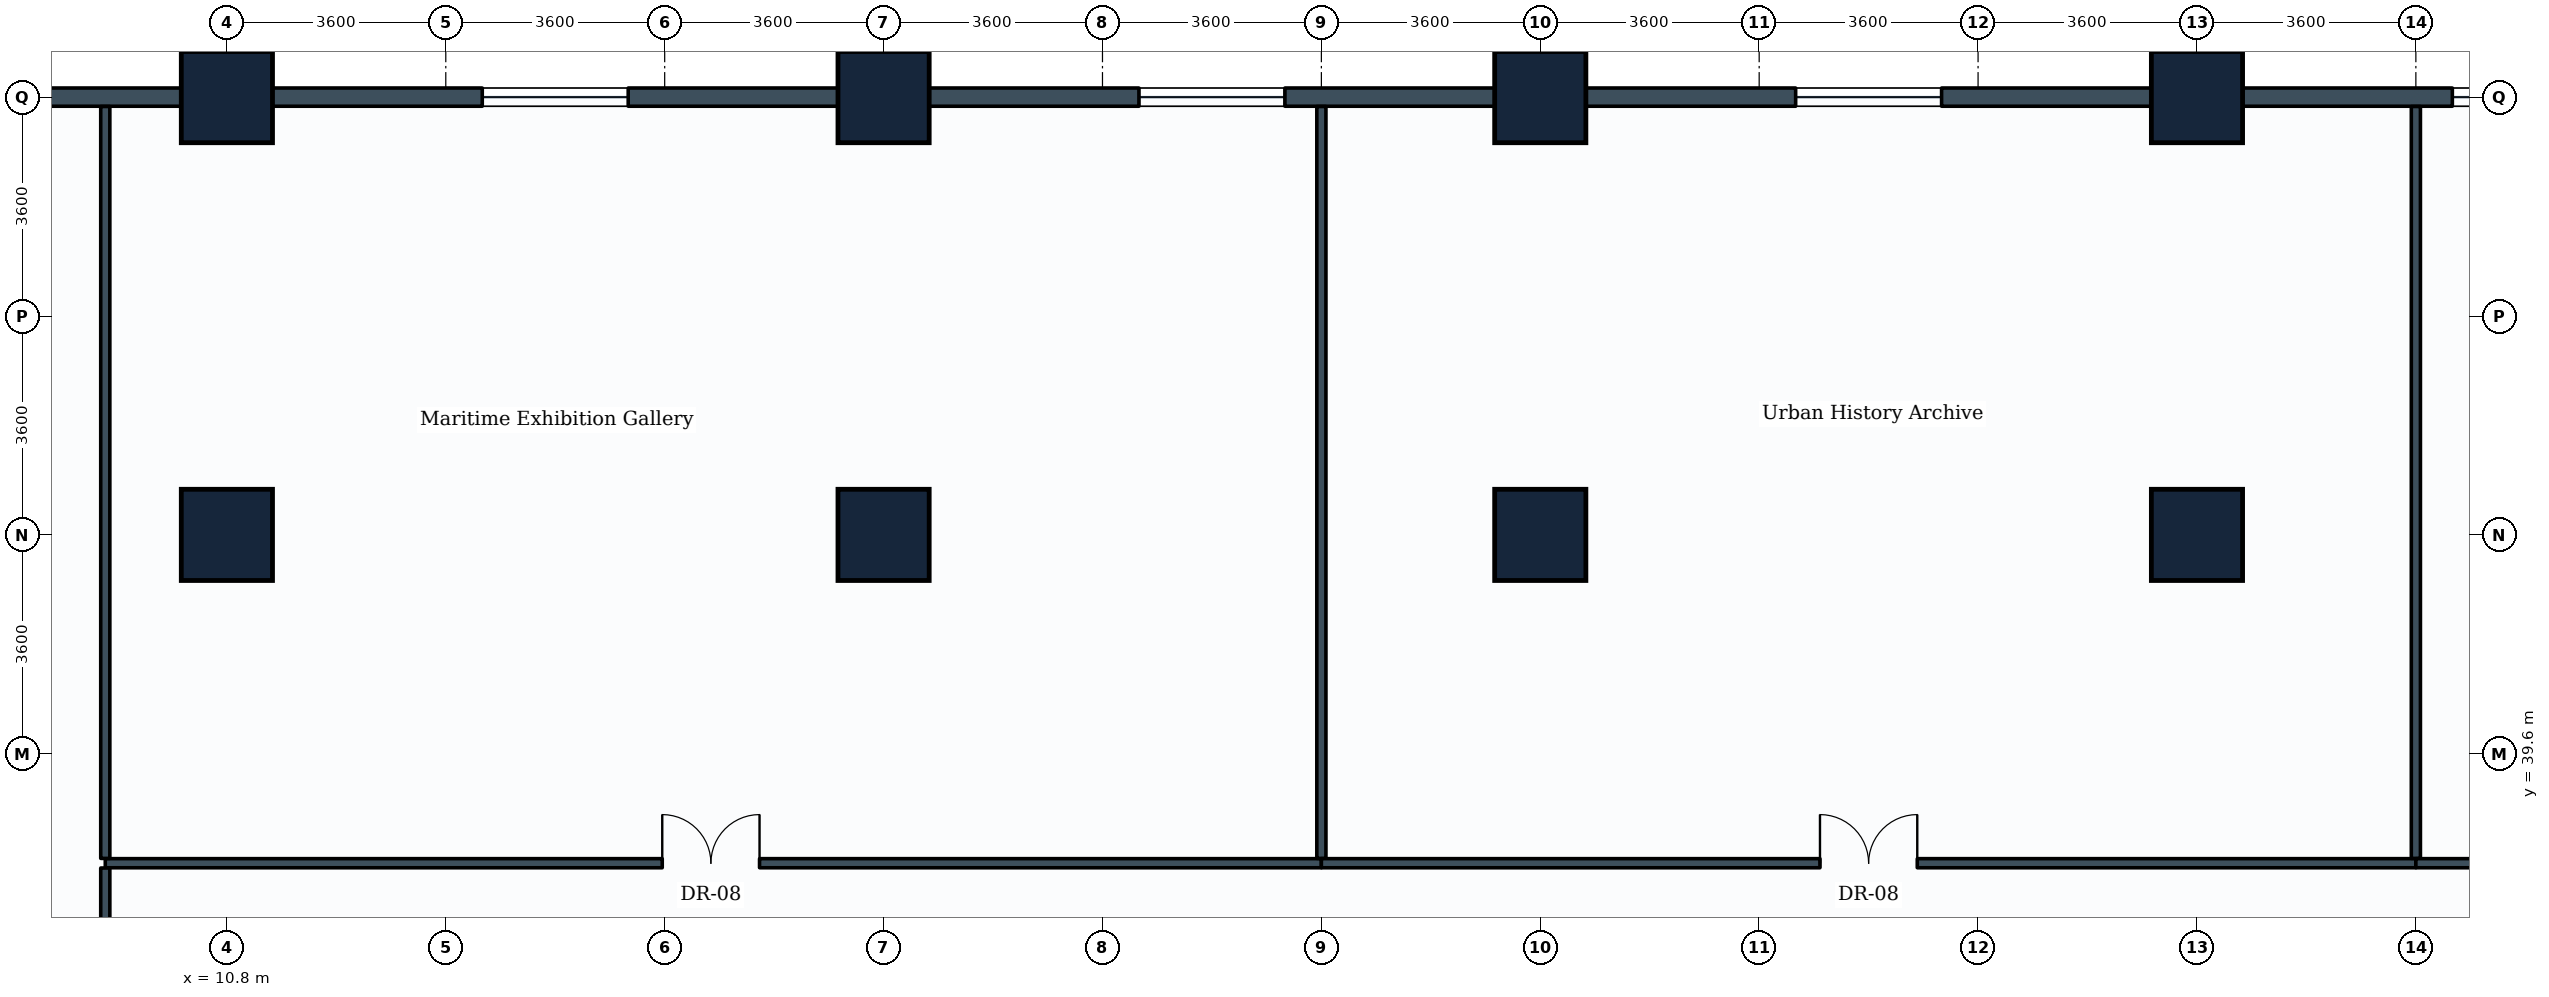
"""IFC4 building model, lengths in metres.
Left out: names, types, materials, properties, quantities, classifications, styles, units other than length and angle.
Written with IfcOpenShell. Run it as: python <this file> out.ifc"""

import sys

from ifc_helpers import new_model, si_unit, direction, frame, frame_2d, origin, origin_2d, place, context, subcontext, project, spatial, rectangle, extrude, element, fill, save


model = new_model("IFC4")
c1 = context("Model", 3, precision=1e-05, world=origin(), true_north=direction((0.0, 1.0)))
c2 = subcontext(c1, "Body", "Model", "MODEL_VIEW")
j1 = project(units=[si_unit("LENGTHUNIT", "METRE"), si_unit("PLANEANGLEUNIT", "RADIAN")], contexts=[c1])
p1 = place(None, origin())
s1 = spatial("IfcSite", under=j1, at=p1, CompositionType="ELEMENT")
p2 = place(p1, origin())
s2 = spatial("IfcBuilding", under=s1, at=p2, CompositionType="ELEMENT")
p3 = place(p2, frame((0.0, 0.0, 10.2)))
s3 = spatial("IfcBuildingStorey", under=s2, at=p3, CompositionType="ELEMENT", Elevation=10.2)
for number, where, z_axis, x_axis in (
    (1, (10.8, 43.2, 0.0), (0.0, 0.0, 1.0), (1.0, 0.0, 0.0)),
    (2, (10.8, 50.4, 0.0), (0.0, 0.0, 1.0), (1.0, 0.0, 0.0)),
    (3, (21.6, 43.2, 0.0), (0.0, 0.0, 1.0), (1.0, 0.0, 0.0)),
    (4, (21.6, 50.4, 0.0), (0.0, 0.0, 1.0), (1.0, 0.0, 0.0)),
    (5, (32.4, 43.2, 0.0), (0.0, 0.0, 1.0), (1.0, 0.0, 0.0)),
    (6, (32.4, 50.4, 0.0), (0.0, 0.0, 1.0), (1.0, 0.0, 0.0)),
    (7, (43.2, 43.2, 0.0), (0.0, 0.0, 1.0), (1.0, 0.0, 0.0)),
    (8, (43.2, 50.4, 0.0), (0.0, 0.0, 1.0), (1.0, 0.0, 0.0)),
):
    element("IfcColumn", number, at=place(p3, frame(where, z_axis=z_axis, x_axis=x_axis)), inside=s3, PredefinedType="COLUMN", context=c2, shape_type="SweptSolid", body=[
        extrude(rectangle(XDim=1.5, YDim=1.5, at=origin_2d()), origin(), (0.0, 0.0, 1.0), 4.6),
    ])
p4 = place(p3, frame((0.0, 50.4, 0.0), z_axis=(0.0, 0.0, 1.0), x_axis=(1.0, 0.0, 0.0)))
e9 = element("IfcWall", 9, at=p4, inside=s3, PredefinedType="STANDARD", context=c2, shape_type="SweptSolid", body=[
    extrude(rectangle(XDim=10.8, YDim=0.3, at=frame_2d((5.4, 0.0))), origin(), (0.0, 0.0, 1.0), 3.63),
])
p5 = place(p4, frame((4.2, 0.0, 0.85)))
e10 = element("IfcOpeningElement", 10, at=p5, cuts=e9, PredefinedType="OPENING", context=c2, shape_type="SweptSolid", body=[
    extrude(rectangle(XDim=2.4, YDim=1.6, at=frame_2d((1.2, 0.8))), frame((0.0, 0.16, 0.0), z_axis=(0.0, -1.0, 0.0), x_axis=(1.0, 0.0, 0.0)), (0.0, 0.0, 1.0), 0.32),
])
p6 = place(p3, frame((10.8, 50.4, 0.0), z_axis=(0.0, 0.0, 1.0), x_axis=(1.0, 0.0, 0.0)))
e11 = element("IfcWall", 11, at=p6, inside=s3, PredefinedType="STANDARD", context=c2, shape_type="SweptSolid", body=[
    extrude(rectangle(XDim=10.8, YDim=0.3, at=frame_2d((5.4, 0.0))), origin(), (0.0, 0.0, 1.0), 3.63),
])
p7 = place(p6, frame((4.2, 0.0, 0.85)))
e12 = element("IfcOpeningElement", 12, at=p7, cuts=e11, PredefinedType="OPENING", context=c2, shape_type="SweptSolid", body=[
    extrude(rectangle(XDim=2.4, YDim=1.6, at=frame_2d((1.2, 0.8))), frame((0.0, 0.16, 0.0), z_axis=(0.0, -1.0, 0.0), x_axis=(1.0, 0.0, 0.0)), (0.0, 0.0, 1.0), 0.32),
])
p8 = place(p3, frame((21.6, 50.4, 0.0), z_axis=(0.0, 0.0, 1.0), x_axis=(1.0, 0.0, 0.0)))
e13 = element("IfcWall", 13, at=p8, inside=s3, PredefinedType="STANDARD", context=c2, shape_type="SweptSolid", body=[
    extrude(rectangle(XDim=10.8, YDim=0.3, at=frame_2d((5.4, 0.0))), origin(), (0.0, 0.0, 1.0), 3.63),
])
p9 = place(p8, frame((4.2, 0.0, 0.85)))
e14 = element("IfcOpeningElement", 14, at=p9, cuts=e13, PredefinedType="OPENING", context=c2, shape_type="SweptSolid", body=[
    extrude(rectangle(XDim=2.4, YDim=1.6, at=frame_2d((1.2, 0.8))), frame((0.0, 0.16, 0.0), z_axis=(0.0, -1.0, 0.0), x_axis=(1.0, 0.0, 0.0)), (0.0, 0.0, 1.0), 0.32),
])
p10 = place(p3, frame((32.4, 50.4, 0.0), z_axis=(0.0, 0.0, 1.0), x_axis=(1.0, 0.0, 0.0)))
e15 = element("IfcWall", 15, at=p10, inside=s3, PredefinedType="STANDARD", context=c2, shape_type="SweptSolid", body=[
    extrude(rectangle(XDim=10.8, YDim=0.3, at=frame_2d((5.4, 0.0))), origin(), (0.0, 0.0, 1.0), 3.63),
])
p11 = place(p10, frame((4.2, 0.0, 0.85)))
e16 = element("IfcOpeningElement", 16, at=p11, cuts=e15, PredefinedType="OPENING", context=c2, shape_type="SweptSolid", body=[
    extrude(rectangle(XDim=2.4, YDim=1.6, at=frame_2d((1.2, 0.8))), frame((0.0, 0.16, 0.0), z_axis=(0.0, -1.0, 0.0), x_axis=(1.0, 0.0, 0.0)), (0.0, 0.0, 1.0), 0.32),
])
p12 = place(p3, frame((43.2, 50.4, 0.0), z_axis=(0.0, 0.0, 1.0), x_axis=(1.0, 0.0, 0.0)))
e17 = element("IfcWall", 17, at=p12, inside=s3, PredefinedType="STANDARD", context=c2, shape_type="SweptSolid", body=[
    extrude(rectangle(XDim=10.8, YDim=0.3, at=frame_2d((5.4, 0.0))), origin(), (0.0, 0.0, 1.0), 3.63),
])
p13 = place(p12, frame((4.2, 0.0, 0.85)))
e18 = element("IfcOpeningElement", 18, at=p13, cuts=e17, PredefinedType="OPENING", context=c2, shape_type="SweptSolid", body=[
    extrude(rectangle(XDim=2.4, YDim=1.6, at=frame_2d((1.2, 0.8))), frame((0.0, 0.16, 0.0), z_axis=(0.0, -1.0, 0.0), x_axis=(1.0, 0.0, 0.0)), (0.0, 0.0, 1.0), 0.32),
])
p14 = place(p3, frame((8.8, 37.8, 0.0), z_axis=(0.0, 0.0, 1.0), x_axis=(1.0, 0.0, 0.0)))
e19 = element("IfcWall", 19, at=p14, inside=s3, PredefinedType="PARTITIONING", context=c2, shape_type="SweptSolid", body=[
    extrude(rectangle(XDim=20.0, YDim=0.15, at=frame_2d((10.0, 0.0))), origin(), (0.0, 0.0, 1.0), 3.63),
])
p15 = place(p14, frame((9.16, 0.0, 0.0)))
e20 = element("IfcOpeningElement", 20, at=p15, cuts=e19, PredefinedType="OPENING", context=c2, shape_type="SweptSolid", body=[
    extrude(rectangle(XDim=1.6, YDim=2.2, at=frame_2d((0.8, 1.1))), frame((0.0, 0.085, 0.0), z_axis=(0.0, -1.0, 0.0), x_axis=(1.0, 0.0, 0.0)), (0.0, 0.0, 1.0), 0.17),
])
p16 = place(p3, frame((28.8, 37.879, 0.0), z_axis=(0.0, 0.0, 1.0), x_axis=(0.0, 1.0, 0.0)))
e21 = element("IfcWall", 21, at=p16, inside=s3, PredefinedType="PARTITIONING", context=c2, shape_type="SweptSolid", body=[
    extrude(rectangle(XDim=12.367, YDim=0.15, at=frame_2d((6.184, 0.0))), origin(), (0.0, 0.0, 1.0), 3.63),
])
p17 = place(p3, frame((28.8, 37.8, 0.0), z_axis=(0.0, 0.0, 1.0), x_axis=(1.0, 0.0, 0.0)))
e22 = element("IfcWall", 22, at=p17, inside=s3, PredefinedType="PARTITIONING", context=c2, shape_type="SweptSolid", body=[
    extrude(rectangle(XDim=18.0, YDim=0.15, at=frame_2d((9.0, 0.0))), origin(), (0.0, 0.0, 1.0), 3.63),
])
p18 = place(p17, frame((8.2, 0.0, 0.0)))
e23 = element("IfcOpeningElement", 23, at=p18, cuts=e22, PredefinedType="OPENING", context=c2, shape_type="SweptSolid", body=[
    extrude(rectangle(XDim=1.6, YDim=2.2, at=frame_2d((0.8, 1.1))), frame((0.0, 0.085, 0.0), z_axis=(0.0, -1.0, 0.0), x_axis=(1.0, 0.0, 0.0)), (0.0, 0.0, 1.0), 0.17),
])
p19 = place(p3, frame((46.8, 37.879, 0.0), z_axis=(0.0, 0.0, 1.0), x_axis=(0.0, 1.0, 0.0)))
e24 = element("IfcWall", 24, at=p19, inside=s3, PredefinedType="PARTITIONING", context=c2, shape_type="SweptSolid", body=[
    extrude(rectangle(XDim=12.367, YDim=0.15, at=frame_2d((6.184, 0.0))), origin(), (0.0, 0.0, 1.0), 3.63),
])
p20 = place(p3, frame((46.8, 37.8, 0.0), z_axis=(0.0, 0.0, 1.0), x_axis=(1.0, 0.0, 0.0)))
e25 = element("IfcWall", 25, at=p20, inside=s3, PredefinedType="PARTITIONING", context=c2, shape_type="SweptSolid", body=[
    extrude(rectangle(XDim=16.4, YDim=0.15, at=frame_2d((8.2, 0.0))), origin(), (0.0, 0.0, 1.0), 3.63),
])
p21 = place(p20, frame((7.4, 0.0, 0.0)))
e26 = element("IfcOpeningElement", 26, at=p21, cuts=e25, PredefinedType="OPENING", context=c2, shape_type="SweptSolid", body=[
    extrude(rectangle(XDim=1.6, YDim=2.2, at=frame_2d((0.8, 1.1))), frame((0.0, 0.085, 0.0), z_axis=(0.0, -1.0, 0.0), x_axis=(1.0, 0.0, 0.0)), (0.0, 0.0, 1.0), 0.17),
])
p22 = place(p3, frame((8.8, 33.6, 0.0), z_axis=(0.0, 0.0, 1.0), x_axis=(0.0, 1.0, 0.0)))
e27 = element("IfcWall", 27, at=p22, inside=s3, PredefinedType="PARTITIONING", context=c2, shape_type="SweptSolid", body=[
    extrude(rectangle(XDim=4.121, YDim=0.15, at=frame_2d((2.061, 0.0))), origin(), (0.0, 0.0, 1.0), 4.285),
])
p23 = place(p22, frame((1.561, 0.0, 0.0)))
e28 = element("IfcOpeningElement", 28, at=p23, cuts=e27, PredefinedType="OPENING", context=c2, shape_type="SweptSolid", body=[
    extrude(rectangle(XDim=1.0, YDim=2.1, at=frame_2d((0.5, 1.05))), frame((0.0, 0.085, 0.0), z_axis=(0.0, -1.0, 0.0), x_axis=(1.0, 0.0, 0.0)), (0.0, 0.0, 1.0), 0.17),
])
p24 = place(p3, frame((8.8, 37.879, 0.0), z_axis=(0.0, 0.0, 1.0), x_axis=(0.0, 1.0, 0.0)))
e29 = element("IfcWall", 29, at=p24, inside=s3, PredefinedType="PARTITIONING", context=c2, shape_type="SweptSolid", body=[
    extrude(rectangle(XDim=12.367, YDim=0.15, at=frame_2d((6.184, 0.0))), origin(), (0.0, 0.0, 1.0), 3.63),
])
p25 = place(p7, origin())
e30 = element("IfcWindow", 30, at=p25, inside=s3, PartitioningType="SINGLE_PANEL", PredefinedType="WINDOW", context=c2, shape_type="SweptSolid", body=[
    extrude(rectangle(XDim=2.4, YDim=1.6, at=frame_2d((1.2, 0.8))), frame((0.0, 0.03, 0.0), z_axis=(0.0, -1.0, 0.0), x_axis=(1.0, 0.0, 0.0)), (0.0, 0.0, 1.0), 0.06),
])
fill(e12, e30)
p26 = place(p9, origin())
e31 = element("IfcWindow", 31, at=p26, inside=s3, PartitioningType="SINGLE_PANEL", PredefinedType="WINDOW", context=c2, shape_type="SweptSolid", body=[
    extrude(rectangle(XDim=2.4, YDim=1.6, at=frame_2d((1.2, 0.8))), frame((0.0, 0.03, 0.0), z_axis=(0.0, -1.0, 0.0), x_axis=(1.0, 0.0, 0.0)), (0.0, 0.0, 1.0), 0.06),
])
fill(e14, e31)
p27 = place(p11, origin())
e32 = element("IfcWindow", 32, at=p27, inside=s3, PartitioningType="SINGLE_PANEL", PredefinedType="WINDOW", context=c2, shape_type="SweptSolid", body=[
    extrude(rectangle(XDim=2.4, YDim=1.6, at=frame_2d((1.2, 0.8))), frame((0.0, 0.03, 0.0), z_axis=(0.0, -1.0, 0.0), x_axis=(1.0, 0.0, 0.0)), (0.0, 0.0, 1.0), 0.06),
])
fill(e16, e32)
p28 = place(p13, origin())
e33 = element("IfcWindow", 33, at=p28, inside=s3, PartitioningType="SINGLE_PANEL", PredefinedType="WINDOW", context=c2, shape_type="SweptSolid", body=[
    extrude(rectangle(XDim=2.4, YDim=1.6, at=frame_2d((1.2, 0.8))), frame((0.0, 0.03, 0.0), z_axis=(0.0, -1.0, 0.0), x_axis=(1.0, 0.0, 0.0)), (0.0, 0.0, 1.0), 0.06),
])
fill(e18, e33)
p29 = place(p15, origin())
e34 = element("IfcDoor", 34, at=p29, inside=s3, OperationType="DOUBLE_DOOR_SINGLE_SWING", PredefinedType="DOOR", context=c2, shape_type="SweptSolid", body=[
    extrude(rectangle(XDim=1.6, YDim=2.2, at=frame_2d((0.8, 1.1))), frame((0.0, 0.025, 0.0), z_axis=(0.0, -1.0, 0.0), x_axis=(1.0, 0.0, 0.0)), (0.0, 0.0, 1.0), 0.05),
])
fill(e20, e34)
p30 = place(p18, origin())
e35 = element("IfcDoor", 35, at=p30, inside=s3, OperationType="DOUBLE_DOOR_SINGLE_SWING", PredefinedType="DOOR", context=c2, shape_type="SweptSolid", body=[
    extrude(rectangle(XDim=1.6, YDim=2.2, at=frame_2d((0.8, 1.1))), frame((0.0, 0.025, 0.0), z_axis=(0.0, -1.0, 0.0), x_axis=(1.0, 0.0, 0.0)), (0.0, 0.0, 1.0), 0.05),
])
fill(e23, e35)
save(model, sys.argv[1])
